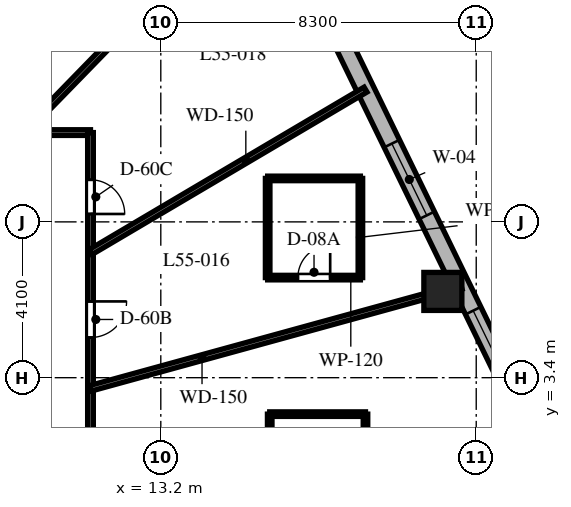
"""IFC4 building model, lengths in metres.
Left out: names, types, materials, properties, quantities, classifications, styles, units other than length and angle.
Written with IfcOpenShell. Run it as: python <this file> out.ifc"""

import sys

from ifc_helpers import new_model, si_unit, direction, frame, frame_2d, origin, origin_2d, place, context, subcontext, project, spatial, rectangle, extrude, element, fill, save


model = new_model("IFC4")
c1 = context("Model", 3, precision=1e-05, world=origin(), true_north=direction((0.0, 1.0)))
c2 = subcontext(c1, "Body", "Model", "MODEL_VIEW")
j1 = project(units=[si_unit("LENGTHUNIT", "METRE"), si_unit("PLANEANGLEUNIT", "RADIAN")], contexts=[c1])
p1 = place(None, origin())
s1 = spatial("IfcSite", under=j1, at=p1, CompositionType="ELEMENT")
p2 = place(p1, origin())
s2 = spatial("IfcBuilding", under=s1, at=p2, CompositionType="ELEMENT")
p3 = place(p2, frame((0.0, 0.0, 221.7)))
s3 = spatial("IfcBuildingStorey", under=s2, at=p3, CompositionType="ELEMENT", Elevation=221.7)
p4 = place(p3, frame((20.622, 5.67, 0.0), z_axis=(0.0, 0.0, 1.0), x_axis=(1.0, 0.0, 0.0)))
e1 = element("IfcColumn", 1, at=p4, inside=s3, PredefinedType="COLUMN", context=c2, shape_type="SweptSolid", body=[
    extrude(rectangle(XDim=1.0, YDim=1.0, at=origin_2d()), origin(), (0.0, 0.0, 1.0), 3.8),
])
p5 = place(p3, frame((22.74, 2.452, 0.0), z_axis=(0.0, 0.0, 1.0), x_axis=(-0.437753424814, 0.899095066755, 0.0)))
e2 = element("IfcWall", 2, at=p5, inside=s3, PredefinedType="SOLIDWALL", context=c2, shape_type="SweptSolid", body=[
    extrude(rectangle(XDim=19.137, YDim=0.45, at=frame_2d((9.569, 0.0))), origin(), (0.0, 0.0, 1.0), 3.5),
])
p6 = place(p5, frame((5.805, 0.0, 0.8)))
e3 = element("IfcOpeningElement", 3, at=p6, cuts=e2, PredefinedType="OPENING", context=c2, shape_type="SweptSolid", body=[
    extrude(rectangle(XDim=2.1, YDim=1.85, at=frame_2d((1.05, 0.925))), frame((0.0, 0.235, 0.0), z_axis=(0.0, -1.0, 0.0), x_axis=(1.0, 0.0, 0.0)), (0.0, 0.0, 1.0), 0.47),
])
p7 = place(p5, frame((11.199, 0.0, 0.8)))
e4 = element("IfcOpeningElement", 4, at=p7, cuts=e2, PredefinedType="OPENING", context=c2, shape_type="SweptSolid", body=[
    extrude(rectangle(XDim=2.1, YDim=1.85, at=frame_2d((1.05, 0.925))), frame((0.0, 0.235, 0.0), z_axis=(0.0, -1.0, 0.0), x_axis=(1.0, 0.0, 0.0)), (0.0, 0.0, 1.0), 0.47),
])
p8 = place(p5, frame((16.173, 0.0, 0.8)))
e5 = element("IfcOpeningElement", 5, at=p8, cuts=e2, PredefinedType="OPENING", context=c2, shape_type="SweptSolid", body=[
    extrude(rectangle(XDim=2.1, YDim=1.85, at=frame_2d((1.05, 0.925))), frame((0.0, 0.235, 0.0), z_axis=(0.0, -1.0, 0.0), x_axis=(1.0, 0.0, 0.0)), (0.0, 0.0, 1.0), 0.47),
])
p9 = place(p5, frame((0.916, 0.0, 0.8)))
e6 = element("IfcOpeningElement", 6, at=p9, cuts=e2, PredefinedType="OPENING", context=c2, shape_type="SweptSolid", body=[
    extrude(rectangle(XDim=2.1, YDim=1.85, at=frame_2d((1.05, 0.925))), frame((0.0, 0.235, 0.0), z_axis=(0.0, -1.0, 0.0), x_axis=(1.0, 0.0, 0.0)), (0.0, 0.0, 1.0), 0.47),
])
p10 = place(p3, frame((0.92, 9.85, 0.0), z_axis=(0.0, 0.0, 1.0), x_axis=(1.0, 0.0, 0.0)))
e7 = element("IfcWall", 7, at=p10, inside=s3, PredefinedType="PARTITIONING", context=c2, shape_type="SweptSolid", body=[
    extrude(rectangle(XDim=10.43, YDim=0.15, at=frame_2d((5.215, 0.0))), origin(), (0.0, 0.0, 1.0), 2.99),
])
p11 = place(p10, frame((4.949, 0.0, 0.0)))
e8 = element("IfcOpeningElement", 8, at=p11, cuts=e7, PredefinedType="OPENING", context=c2, shape_type="SweptSolid", body=[
    extrude(rectangle(XDim=0.95, YDim=2.03, at=frame_2d((0.475, 1.015))), frame((0.0, 0.085, 0.0), z_axis=(0.0, -1.0, 0.0), x_axis=(1.0, 0.0, 0.0)), (0.0, 0.0, 1.0), 0.17),
])
p12 = place(p3, frame((11.35, 9.85, 0.0), z_axis=(0.0, 0.0, 1.0), x_axis=(0.0, -1.0, 0.0)))
e9 = element("IfcWall", 9, at=p12, inside=s3, PredefinedType="PARTITIONING", context=c2, shape_type="SweptSolid", body=[
    extrude(rectangle(XDim=12.4, YDim=0.15, at=frame_2d((6.2, 0.0))), origin(), (0.0, 0.0, 1.0), 2.99),
])
p13 = place(p12, frame((4.443, 0.0, 0.0)))
e10 = element("IfcOpeningElement", 10, at=p13, cuts=e9, PredefinedType="OPENING", context=c2, shape_type="SweptSolid", body=[
    extrude(rectangle(XDim=0.95, YDim=2.03, at=frame_2d((0.475, 1.015))), frame((0.0, 0.085, 0.0), z_axis=(0.0, -1.0, 0.0), x_axis=(1.0, 0.0, 0.0)), (0.0, 0.0, 1.0), 0.17),
])
p14 = place(p12, frame((1.242, 0.0, 0.0)))
e11 = element("IfcOpeningElement", 11, at=p14, cuts=e9, PredefinedType="OPENING", context=c2, shape_type="SweptSolid", body=[
    extrude(rectangle(XDim=0.9, YDim=2.03, at=frame_2d((0.45, 1.015))), frame((0.0, 0.085, 0.0), z_axis=(0.0, -1.0, 0.0), x_axis=(1.0, 0.0, 0.0)), (0.0, 0.0, 1.0), 0.17),
])
p15 = place(p12, frame((8.835, 0.0, 0.0)))
e12 = element("IfcOpeningElement", 12, at=p15, cuts=e9, PredefinedType="OPENING", context=c2, shape_type="SweptSolid", body=[
    extrude(rectangle(XDim=0.95, YDim=2.03, at=frame_2d((0.475, 1.015))), frame((0.0, 0.085, 0.0), z_axis=(0.0, -1.0, 0.0), x_axis=(1.0, 0.0, 0.0)), (0.0, 0.0, 1.0), 0.17),
])
p16 = place(p3, frame((11.35, 3.121, 0.0), z_axis=(0.0, 0.0, 1.0), x_axis=(0.964212793822, 0.265129568758, 0.0)))
e13 = element("IfcWall", 13, at=p16, inside=s3, PredefinedType="PARTITIONING", context=c2, shape_type="SweptSolid", body=[
    extrude(rectangle(XDim=10.12, YDim=0.15, at=frame_2d((5.06, 0.0))), origin(), (0.0, 0.0, 1.0), 2.74),
])
p17 = place(p3, frame((11.35, 6.705, 0.0), z_axis=(0.0, 0.0, 1.0), x_axis=(0.86097625004, 0.508645158108, 0.0)))
e14 = element("IfcWall", 14, at=p17, inside=s3, PredefinedType="PARTITIONING", context=c2, shape_type="SweptSolid", body=[
    extrude(rectangle(XDim=8.406, YDim=0.15, at=frame_2d((4.203, 0.0))), origin(), (0.0, 0.0, 1.0), 2.74),
])
p18 = place(p3, frame((9.588, 9.85, 0.0), z_axis=(0.0, 0.0, 1.0), x_axis=(0.697519469595, 0.716565830567, 0.0)))
e15 = element("IfcWall", 15, at=p18, inside=s3, PredefinedType="PARTITIONING", context=c2, shape_type="SweptSolid", body=[
    extrude(rectangle(XDim=9.126, YDim=0.15, at=frame_2d((4.563, 0.0))), origin(), (0.0, 0.0, 1.0), 2.74),
])
p19 = place(p3, frame((16.012, 6.034, 0.0), z_axis=(0.0, 0.0, 1.0), x_axis=(1.0, 0.0, 0.0)))
e16 = element("IfcWall", 16, at=p19, inside=s3, PredefinedType="PARTITIONING", context=c2, shape_type="SweptSolid", body=[
    extrude(rectangle(XDim=2.44, YDim=0.12, at=frame_2d((1.22, 0.0))), origin(), (0.0, 0.0, 1.0), 2.94),
])
p20 = place(p19, frame((0.795, 0.0, 0.0)))
e17 = element("IfcOpeningElement", 17, at=p20, cuts=e16, PredefinedType="OPENING", context=c2, shape_type="SweptSolid", body=[
    extrude(rectangle(XDim=0.85, YDim=2.03, at=frame_2d((0.425, 1.015))), frame((0.0, 0.07, 0.0), z_axis=(0.0, -1.0, 0.0), x_axis=(1.0, 0.0, 0.0)), (0.0, 0.0, 1.0), 0.14),
])
p21 = place(p3, frame((18.452, 6.034, 0.0), z_axis=(0.0, 0.0, 1.0), x_axis=(0.0, 1.0, 0.0)))
e18 = element("IfcWall", 18, at=p21, inside=s3, PredefinedType="PARTITIONING", context=c2, shape_type="SweptSolid", body=[
    extrude(rectangle(XDim=2.61, YDim=0.12, at=frame_2d((1.305, 0.0))), origin(), (0.0, 0.0, 1.0), 2.99),
])
p22 = place(p3, frame((18.452, 8.644, 0.0), z_axis=(0.0, 0.0, 1.0), x_axis=(-1.0, 0.0, 0.0)))
e19 = element("IfcWall", 19, at=p22, inside=s3, PredefinedType="PARTITIONING", context=c2, shape_type="SweptSolid", body=[
    extrude(rectangle(XDim=2.44, YDim=0.12, at=frame_2d((1.22, 0.0))), origin(), (0.0, 0.0, 1.0), 3.5),
])
p23 = place(p3, frame((16.012, 8.644, 0.0), z_axis=(0.0, 0.0, 1.0), x_axis=(0.0, -1.0, 0.0)))
e20 = element("IfcWall", 20, at=p23, inside=s3, PredefinedType="PARTITIONING", context=c2, shape_type="SweptSolid", body=[
    extrude(rectangle(XDim=2.61, YDim=0.12, at=frame_2d((1.305, 0.0))), origin(), (0.0, 0.0, 1.0), 2.99),
])
p24 = place(p3, frame((18.586, -0.239, 0.0), z_axis=(0.0, 0.0, 1.0), x_axis=(0.0, 1.0, 0.0)))
e21 = element("IfcWall", 21, at=p24, inside=s3, PredefinedType="PARTITIONING", context=c2, shape_type="SweptSolid", body=[
    extrude(rectangle(XDim=2.68, YDim=0.12, at=frame_2d((1.34, 0.0))), origin(), (0.0, 0.0, 1.0), 3.5),
])
p25 = place(p3, frame((18.586, 2.441, 0.0), z_axis=(0.0, 0.0, 1.0), x_axis=(-1.0, 0.0, 0.0)))
e22 = element("IfcWall", 22, at=p25, inside=s3, PredefinedType="PARTITIONING", context=c2, shape_type="SweptSolid", body=[
    extrude(rectangle(XDim=2.52, YDim=0.12, at=frame_2d((1.26, 0.0))), origin(), (0.0, 0.0, 1.0), 2.94),
])
p26 = place(p3, frame((16.066, 2.441, 0.0), z_axis=(0.0, 0.0, 1.0), x_axis=(0.0, -1.0, 0.0)))
e23 = element("IfcWall", 23, at=p26, inside=s3, PredefinedType="PARTITIONING", context=c2, shape_type="SweptSolid", body=[
    extrude(rectangle(XDim=2.68, YDim=0.12, at=frame_2d((1.34, 0.0))), origin(), (0.0, 0.0, 1.0), 3.5),
])
p27 = place(p6, origin())
e24 = element("IfcWindow", 24, at=p27, inside=s3, PartitioningType="SINGLE_PANEL", PredefinedType="WINDOW", context=c2, shape_type="SweptSolid", body=[
    extrude(rectangle(XDim=2.1, YDim=1.85, at=frame_2d((1.05, 0.925))), frame((0.0, 0.03, 0.0), z_axis=(0.0, -1.0, 0.0), x_axis=(1.0, 0.0, 0.0)), (0.0, 0.0, 1.0), 0.06),
])
fill(e3, e24)
p28 = place(p9, origin())
e25 = element("IfcWindow", 25, at=p28, inside=s3, PartitioningType="SINGLE_PANEL", PredefinedType="WINDOW", context=c2, shape_type="SweptSolid", body=[
    extrude(rectangle(XDim=2.1, YDim=1.85, at=frame_2d((1.05, 0.925))), frame((0.0, 0.03, 0.0), z_axis=(0.0, -1.0, 0.0), x_axis=(1.0, 0.0, 0.0)), (0.0, 0.0, 1.0), 0.06),
])
fill(e6, e25)
p29 = place(p13, origin())
e26 = element("IfcDoor", 26, at=p29, inside=s3, OperationType="SINGLE_SWING_LEFT", PredefinedType="DOOR", context=c2, shape_type="SweptSolid", body=[
    extrude(rectangle(XDim=0.95, YDim=2.03, at=frame_2d((0.475, 1.015))), frame((0.0, 0.025, 0.0), z_axis=(0.0, -1.0, 0.0), x_axis=(1.0, 0.0, 0.0)), (0.0, 0.0, 1.0), 0.05),
])
fill(e10, e26)
p30 = place(p20, origin())
e27 = element("IfcDoor", 27, at=p30, inside=s3, OperationType="SINGLE_SWING_RIGHT", PredefinedType="DOOR", context=c2, shape_type="SweptSolid", body=[
    extrude(rectangle(XDim=0.85, YDim=2.03, at=frame_2d((0.425, 1.015))), frame((0.0, 0.025, 0.0), z_axis=(0.0, -1.0, 0.0), x_axis=(1.0, 0.0, 0.0)), (0.0, 0.0, 1.0), 0.05),
])
fill(e17, e27)
p31 = place(p14, origin())
e28 = element("IfcDoor", 28, at=p31, inside=s3, OperationType="SINGLE_SWING_RIGHT", PredefinedType="DOOR", context=c2, shape_type="SweptSolid", body=[
    extrude(rectangle(XDim=0.9, YDim=2.03, at=frame_2d((0.45, 1.015))), frame((0.0, 0.025, 0.0), z_axis=(0.0, -1.0, 0.0), x_axis=(1.0, 0.0, 0.0)), (0.0, 0.0, 1.0), 0.05),
])
fill(e11, e28)
save(model, sys.argv[1])
